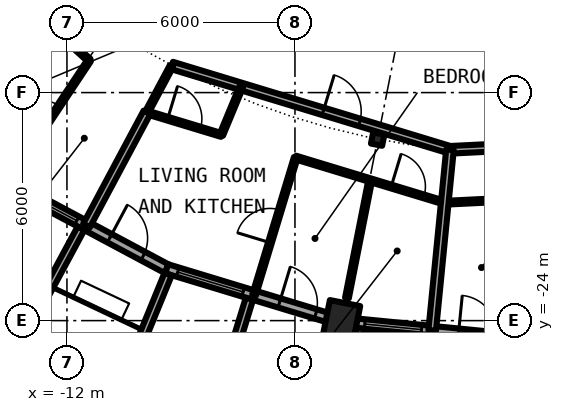
"""IFC4 building model, lengths in metres.
Left out: names, types, materials, properties, quantities, classifications, styles, units other than length and angle.
Written with IfcOpenShell. Run it as: python <this file> out.ifc"""

import sys

from ifc_helpers import new_model, si_unit, direction, frame, frame_2d, origin, origin_2d, place, context, subcontext, project, spatial, rectangle, hollow_circle, i_section, extrude, element, fill, save


model = new_model("IFC4")
c1 = context("Model", 3, precision=1e-05, world=origin(), true_north=direction((0.0, 1.0)))
c2 = subcontext(c1, "Body", "Model", "MODEL_VIEW")
j1 = project(units=[si_unit("LENGTHUNIT", "METRE"), si_unit("PLANEANGLEUNIT", "RADIAN")], contexts=[c1])
p1 = place(None, origin())
s1 = spatial("IfcSite", under=j1, at=p1, CompositionType="ELEMENT")
p2 = place(p1, origin())
s2 = spatial("IfcBuilding", under=s1, at=p2, CompositionType="ELEMENT")
p3 = place(p2, frame((0.0, 0.0, 243.2)))
s3 = spatial("IfcBuildingStorey", under=s2, at=p3, CompositionType="ELEMENT", Elevation=243.2)
p4 = place(p3, frame((-4.934, -24.803, 0.242), z_axis=(0.081385783955, 0.409141348854, 0.908834259273), x_axis=(-0.980784129255, 0.195096109141, 0.0)))
e1 = element("IfcColumn", 1, at=p4, inside=s3, PredefinedType="COLUMN", context=c2, shape_type="SweptSolid", body=[
    extrude(hollow_circle(Radius=0.406, WallThickness=0.03, at=origin_2d()), origin(), (0.0, 0.0, 1.0), 3.09),
])
p5 = place(p3, frame((-3.824, -19.223, 0.0), z_axis=(0.0, 0.0, 1.0), x_axis=(-0.195090322016, -0.980785280403, 0.0)))
e2 = element("IfcColumn", 2, at=p5, inside=s3, PredefinedType="COLUMN", context=c2, shape_type="SweptSolid", body=[
    extrude(i_section(OverallWidth=0.3, OverallDepth=0.3, WebThickness=0.011, FlangeThickness=0.019, FilletRadius=0.027, at=origin_2d()), origin(), (0.0, 0.0, 1.0), 3.05),
])
p6 = place(p3, frame((-13.611, -20.371, 0.0), z_axis=(0.0, 0.0, 1.0), x_axis=(0.881903608701, -0.471429766731, 0.0)))
e3 = element("IfcWall", 3, at=p6, inside=s3, PredefinedType="SOLIDWALL", context=c2, shape_type="SweptSolid", body=[
    extrude(rectangle(XDim=4.802, YDim=0.25, at=frame_2d((2.401, 0.0))), origin(), (0.0, 0.0, 1.0), 2.7),
])
p7 = place(p6, frame((0.62, 0.0, 0.3)))
e4 = element("IfcOpeningElement", 4, at=p7, cuts=e3, PredefinedType="OPENING", context=c2, shape_type="SweptSolid", body=[
    extrude(rectangle(XDim=1.5, YDim=2.1, at=frame_2d((0.75, 1.05))), frame((0.0, 0.135, 0.0), z_axis=(0.0, -1.0, 0.0), x_axis=(1.0, 0.0, 0.0)), (0.0, 0.0, 1.0), 0.27),
])
p8 = place(p6, frame((3.099, 0.0, 0.0)))
e5 = element("IfcOpeningElement", 5, at=p8, cuts=e3, PredefinedType="OPENING", context=c2, shape_type="SweptSolid", body=[
    extrude(rectangle(XDim=1.0, YDim=2.2, at=frame_2d((0.5, 1.1))), frame((0.0, 0.135, 0.0), z_axis=(0.0, -1.0, 0.0), x_axis=(1.0, 0.0, 0.0)), (0.0, 0.0, 1.0), 0.27),
])
p9 = place(p3, frame((-11.631, -21.572, -0.03), z_axis=(0.0, 0.0, 1.0), x_axis=(-0.474649669009, -0.880174807473, 0.0)))
e6 = element("IfcWall", 6, at=p9, inside=s3, PredefinedType="SOLIDWALL", context=c2, shape_type="SweptSolid", body=[
    extrude(rectangle(XDim=2.991, YDim=0.2, at=frame_2d((1.496, 0.0))), origin(), (0.0, 0.0, 1.0), 2.73),
])
p10 = place(p3, frame((-9.376, -22.635, 0.0), z_axis=(0.0, 0.0, 1.0), x_axis=(0.956947414517, -0.290261340605, 0.0)))
e7 = element("IfcWall", 7, at=p10, inside=s3, PredefinedType="SOLIDWALL", context=c2, shape_type="SweptSolid", body=[
    extrude(rectangle(XDim=4.803, YDim=0.25, at=frame_2d((2.401, 0.0))), origin(), (0.0, 0.0, 1.0), 2.7),
])
p11 = place(p10, frame((0.304, 0.0, 0.3)))
e8 = element("IfcOpeningElement", 8, at=p11, cuts=e7, PredefinedType="OPENING", context=c2, shape_type="SweptSolid", body=[
    extrude(rectangle(XDim=1.8, YDim=2.1, at=frame_2d((0.9, 1.05))), frame((0.0, 0.135, 0.0), z_axis=(0.0, -1.0, 0.0), x_axis=(1.0, 0.0, 0.0)), (0.0, 0.0, 1.0), 0.27),
])
p12 = place(p10, frame((3.099, 0.0, 0.0)))
e9 = element("IfcOpeningElement", 9, at=p12, cuts=e7, PredefinedType="OPENING", context=c2, shape_type="SweptSolid", body=[
    extrude(rectangle(XDim=1.0, YDim=2.2, at=frame_2d((0.5, 1.1))), frame((0.0, 0.135, 0.0), z_axis=(0.0, -1.0, 0.0), x_axis=(1.0, 0.0, 0.0)), (0.0, 0.0, 1.0), 0.27),
])
p13 = place(p3, frame((-9.338, -22.777, -0.03), z_axis=(0.0, 0.0, 1.0), x_axis=(-0.379219850791, -0.925306600412, 0.0)))
e10 = element("IfcWall", 10, at=p13, inside=s3, PredefinedType="SOLIDWALL", context=c2, shape_type="SweptSolid", body=[
    extrude(rectangle(XDim=2.882, YDim=0.2, at=frame_2d((1.441, 0.0))), origin(), (0.0, 0.0, 1.0), 2.73),
])
p14 = place(p3, frame((-7.199, -23.426, -0.03), z_axis=(0.0, 0.0, 1.0), x_axis=(-0.293764720054, -0.95587775853, 0.0)))
e11 = element("IfcWall", 11, at=p14, inside=s3, PredefinedType="SOLIDWALL", context=c2, shape_type="SweptSolid", body=[
    extrude(rectangle(XDim=2.992, YDim=0.2, at=frame_2d((1.496, 0.0))), origin(), (0.0, 0.0, 1.0), 2.73),
])
p15 = place(p3, frame((-4.78, -24.029, 0.0), z_axis=(0.0, 0.0, 1.0), x_axis=(0.995181568754, -0.098049197923, 0.0)))
e12 = element("IfcWall", 12, at=p15, inside=s3, PredefinedType="SOLIDWALL", context=c2, shape_type="SweptSolid", body=[
    extrude(rectangle(XDim=4.803, YDim=0.25, at=frame_2d((2.402, 0.0))), origin(), (0.0, 0.0, 1.0), 2.7),
])
p16 = place(p15, frame((0.62, 0.0, 0.3)))
e13 = element("IfcOpeningElement", 13, at=p16, cuts=e12, PredefinedType="OPENING", context=c2, shape_type="SweptSolid", body=[
    extrude(rectangle(XDim=1.5, YDim=2.1, at=frame_2d((0.75, 1.05))), frame((0.0, 0.135, 0.0), z_axis=(0.0, -1.0, 0.0), x_axis=(1.0, 0.0, 0.0)), (0.0, 0.0, 1.0), 0.27),
])
p17 = place(p15, frame((3.099, 0.0, 0.0)))
e14 = element("IfcOpeningElement", 14, at=p17, cuts=e12, PredefinedType="OPENING", context=c2, shape_type="SweptSolid", body=[
    extrude(rectangle(XDim=1.0, YDim=2.2, at=frame_2d((0.5, 1.1))), frame((0.0, 0.135, 0.0), z_axis=(0.0, -1.0, 0.0), x_axis=(1.0, 0.0, 0.0)), (0.0, 0.0, 1.0), 0.27),
])
p18 = place(p3, frame((-4.274, -24.205, -0.03), z_axis=(0.0, 0.0, 1.0), x_axis=(-0.173637488752, -0.984809637697, 0.0)))
e15 = element("IfcWall", 15, at=p18, inside=s3, PredefinedType="SOLIDWALL", context=c2, shape_type="SweptSolid", body=[
    extrude(rectangle(XDim=2.92, YDim=0.2, at=frame_2d((1.46, 0.0))), origin(), (0.0, 0.0, 1.0), 2.73),
])
p19 = place(p3, frame((-2.058, -20.899, 0.0), z_axis=(0.0, 0.0, 1.0), x_axis=(0.998793793092, 0.049101516075, 0.0)))
e16 = element("IfcWall", 16, at=p19, inside=s3, PredefinedType="PARTITIONING", context=c2, shape_type="SweptSolid", body=[
    extrude(rectangle(XDim=2.053, YDim=0.1, at=frame_2d((1.027, 0.0))), origin(), (0.0, 0.0, 1.0), 2.7),
])
p20 = place(p3, frame((-9.893, -18.523, 0.0), z_axis=(0.0, 0.0, 1.0), x_axis=(0.957015380529, -0.2900371725, 0.0)))
e17 = element("IfcWall", 17, at=p20, inside=s3, PredefinedType="PARTITIONING", context=c2, shape_type="SweptSolid", body=[
    extrude(rectangle(XDim=2.048, YDim=0.1, at=frame_2d((1.024, 0.0))), origin(), (0.0, 0.0, 1.0), 2.7),
])
p21 = place(p20, frame((0.568, 0.0, 0.0)))
e18 = element("IfcOpeningElement", 18, at=p21, cuts=e17, PredefinedType="OPENING", context=c2, shape_type="SweptSolid", body=[
    extrude(rectangle(XDim=0.9, YDim=2.3, at=frame_2d((0.45, 1.15))), frame((0.0, 0.06, 0.0), z_axis=(0.0, -1.0, 0.0), x_axis=(1.0, 0.0, 0.0)), (0.0, 0.0, 1.0), 0.12),
])
p22 = place(p3, frame((-5.982, -19.709, 0.0), z_axis=(0.0, 0.0, 1.0), x_axis=(0.956962336556, -0.290212140362, 0.0)))
e19 = element("IfcWall", 19, at=p22, inside=s3, PredefinedType="PARTITIONING", context=c2, shape_type="SweptSolid", body=[
    extrude(rectangle(XDim=4.104, YDim=0.1, at=frame_2d((2.052, 0.0))), origin(), (0.0, 0.0, 1.0), 2.7),
])
p23 = place(p22, frame((2.628, 0.0, 0.0)))
e20 = element("IfcOpeningElement", 20, at=p23, cuts=e19, PredefinedType="OPENING", context=c2, shape_type="SweptSolid", body=[
    extrude(rectangle(XDim=0.9, YDim=2.3, at=frame_2d((0.45, 1.15))), frame((0.0, 0.06, 0.0), z_axis=(0.0, -1.0, 0.0), x_axis=(1.0, 0.0, 0.0)), (0.0, 0.0, 1.0), 0.12),
])
p24 = place(p3, frame((-14.437, -14.409, 0.0), z_axis=(0.0, 0.0, 1.0), x_axis=(0.740802780294, -0.671722592078, 0.0)))
e21 = element("IfcWall", 21, at=p24, inside=s3, PredefinedType="PARTITIONING", context=c2, shape_type="SweptSolid", body=[
    extrude(rectangle(XDim=4.082, YDim=0.1, at=frame_2d((2.041, 0.0))), origin(), (0.0, 0.0, 1.0), 2.7),
])
p25 = place(p24, frame((2.612, 0.0, 0.0)))
e22 = element("IfcOpeningElement", 22, at=p25, cuts=e21, PredefinedType="OPENING", context=c2, shape_type="SweptSolid", body=[
    extrude(rectangle(XDim=0.9, YDim=2.3, at=frame_2d((0.45, 1.15))), frame((0.0, 0.06, 0.0), z_axis=(0.0, -1.0, 0.0), x_axis=(1.0, 0.0, 0.0)), (0.0, 0.0, 1.0), 0.12),
])
p26 = place(p3, frame((-1.921, -19.506, 0.0), z_axis=(0.0, 0.0, 1.0), x_axis=(0.998783562084, 0.049309188909, 0.0)))
e23 = element("IfcWall", 23, at=p26, inside=s3, PredefinedType="PARTITIONING", context=c2, shape_type="SweptSolid", body=[
    extrude(rectangle(XDim=5.6, YDim=0.2, at=frame_2d((2.8, 0.0))), origin(), (0.0, 0.0, 1.0), 2.45),
])
p27 = place(p26, frame((1.417, 0.0, 0.0)))
e24 = element("IfcOpeningElement", 24, at=p27, cuts=e23, PredefinedType="OPENING", context=c2, shape_type="SweptSolid", body=[
    extrude(rectangle(XDim=1.0, YDim=2.3, at=frame_2d((0.5, 1.15))), frame((0.0, 0.11, 0.0), z_axis=(0.0, -1.0, 0.0), x_axis=(1.0, 0.0, 0.0)), (0.0, 0.0, 1.0), 0.22),
])
p28 = place(p3, frame((-9.239, -17.286, 0.0), z_axis=(0.0, 0.0, 1.0), x_axis=(0.956929842753, -0.290319265721, 0.0)))
e25 = element("IfcWall", 25, at=p28, inside=s3, PredefinedType="PARTITIONING", context=c2, shape_type="SweptSolid", body=[
    extrude(rectangle(XDim=7.647, YDim=0.2, at=frame_2d((3.824, 0.0))), origin(), (0.0, 0.0, 1.0), 2.45),
])
p29 = place(p28, frame((4.161, 0.0, 0.0)))
e26 = element("IfcOpeningElement", 26, at=p29, cuts=e25, PredefinedType="OPENING", context=c2, shape_type="SweptSolid", body=[
    extrude(rectangle(XDim=1.0, YDim=2.3, at=frame_2d((0.5, 1.15))), frame((0.0, 0.11, 0.0), z_axis=(0.0, -1.0, 0.0), x_axis=(1.0, 0.0, 0.0)), (0.0, 0.0, 1.0), 0.22),
])
p30 = place(p3, frame((-13.217, -19.864, 0.0), z_axis=(0.0, 0.0, 1.0), x_axis=(0.553749157203, 0.832683535862, 0.0)))
e27 = element("IfcWall", 27, at=p30, inside=s3, PredefinedType="PARTITIONING", context=c2, shape_type="SweptSolid", body=[
    extrude(rectangle(XDim=3.26, YDim=0.1, at=frame_2d((1.63, 0.0))), origin(), (0.0, 0.0, 1.0), 2.7),
])
p31 = place(p30, frame((0.922, 0.0, 0.0)))
e28 = element("IfcOpeningElement", 28, at=p31, cuts=e27, PredefinedType="OPENING", context=c2, shape_type="SweptSolid", body=[
    extrude(rectangle(XDim=0.9, YDim=2.3, at=frame_2d((0.45, 1.15))), frame((0.0, 0.06, 0.0), z_axis=(0.0, -1.0, 0.0), x_axis=(1.0, 0.0, 0.0)), (0.0, 0.0, 1.0), 0.12),
])
p32 = place(p3, frame((-11.485, -21.499, 0.0), z_axis=(0.0, 0.0, 1.0), x_axis=(0.471125037246, 0.882066436999, 0.0)))
e29 = element("IfcWall", 29, at=p32, inside=s3, PredefinedType="PARTITIONING", context=c2, shape_type="SweptSolid", body=[
    extrude(rectangle(XDim=3.375, YDim=0.2, at=frame_2d((1.688, 0.0))), origin(), (0.0, 0.0, 1.0), 2.7),
])
p33 = place(p3, frame((-7.939, -19.115, 0.0), z_axis=(0.0, 0.0, 1.0), x_axis=(0.383534338408, 0.923526616434, 0.0)))
e30 = element("IfcWall", 30, at=p33, inside=s3, PredefinedType="PARTITIONING", context=c2, shape_type="SweptSolid", body=[
    extrude(rectangle(XDim=1.379, YDim=0.1, at=frame_2d((0.69, 0.0))), origin(), (0.0, 0.0, 1.0), 2.7),
])
p34 = place(p3, frame((-7.076, -23.325, 0.0), z_axis=(0.0, 0.0, 1.0), x_axis=(0.290364312451, 0.956916175041, 0.0)))
e31 = element("IfcWall", 31, at=p34, inside=s3, PredefinedType="PARTITIONING", context=c2, shape_type="SweptSolid", body=[
    extrude(rectangle(XDim=3.778, YDim=0.1, at=frame_2d((1.889, 0.0))), origin(), (0.0, 0.0, 1.0), 2.7),
])
p35 = place(p34, frame((1.439, 0.0, 0.0)))
e32 = element("IfcOpeningElement", 32, at=p35, cuts=e31, PredefinedType="OPENING", context=c2, shape_type="SweptSolid", body=[
    extrude(rectangle(XDim=0.9, YDim=2.3, at=frame_2d((0.45, 1.15))), frame((0.0, 0.06, 0.0), z_axis=(0.0, -1.0, 0.0), x_axis=(1.0, 0.0, 0.0)), (0.0, 0.0, 1.0), 0.12),
])
p36 = place(p3, frame((-2.389, -24.258, 0.0), z_axis=(0.0, 0.0, 1.0), x_axis=(0.098015283173, 0.995184909584, 0.0)))
e33 = element("IfcWall", 33, at=p36, inside=s3, PredefinedType="PARTITIONING", context=c2, shape_type="SweptSolid", body=[
    extrude(rectangle(XDim=4.775, YDim=0.2, at=frame_2d((2.387, 0.0))), origin(), (0.0, 0.0, 1.0), 2.7),
])
p37 = place(p3, frame((-4.632, -23.405, 0.0), z_axis=(0.0, 0.0, 1.0), x_axis=(0.193932328519, 0.98101490914, 0.0)))
e34 = element("IfcWall", 34, at=p37, inside=s3, PredefinedType="PARTITIONING", context=c2, shape_type="SweptSolid", body=[
    extrude(rectangle(XDim=3.161, YDim=0.1, at=frame_2d((1.581, 0.0))), origin(), (0.0, 0.0, 1.0), 2.7),
])
p38 = place(p3, frame((-9.889, -18.502, 0.0), z_axis=(0.0, 0.0, 1.0), x_axis=(0.471138605408, 0.882059189904, 0.0)))
e35 = element("IfcWall", 35, at=p38, inside=s3, PredefinedType="PARTITIONING", context=c2, shape_type="SweptSolid", body=[
    extrude(rectangle(XDim=1.358, YDim=0.1, at=frame_2d((0.679, 0.0))), origin(), (0.0, 0.0, 1.0), 2.7),
])
p39 = place(p7, origin())
e36 = element("IfcWindow", 36, at=p39, inside=s3, PartitioningType="SINGLE_PANEL", PredefinedType="WINDOW", context=c2, shape_type="SweptSolid", body=[
    extrude(rectangle(XDim=1.5, YDim=2.1, at=frame_2d((0.75, 1.05))), frame((0.0, 0.03, 0.0), z_axis=(0.0, -1.0, 0.0), x_axis=(1.0, 0.0, 0.0)), (0.0, 0.0, 1.0), 0.06),
])
fill(e4, e36)
p40 = place(p8, origin())
e37 = element("IfcDoor", 37, at=p40, inside=s3, OperationType="SINGLE_SWING_LEFT", PredefinedType="DOOR", context=c2, shape_type="SweptSolid", body=[
    extrude(rectangle(XDim=1.0, YDim=2.2, at=frame_2d((0.5, 1.1))), frame((0.0, 0.025, 0.0), z_axis=(0.0, -1.0, 0.0), x_axis=(1.0, 0.0, 0.0)), (0.0, 0.0, 1.0), 0.05),
])
fill(e5, e37)
p41 = place(p11, origin())
e38 = element("IfcWindow", 38, at=p41, inside=s3, PartitioningType="SINGLE_PANEL", PredefinedType="WINDOW", context=c2, shape_type="SweptSolid", body=[
    extrude(rectangle(XDim=1.8, YDim=2.1, at=frame_2d((0.9, 1.05))), frame((0.0, 0.03, 0.0), z_axis=(0.0, -1.0, 0.0), x_axis=(1.0, 0.0, 0.0)), (0.0, 0.0, 1.0), 0.06),
])
fill(e8, e38)
p42 = place(p12, origin())
e39 = element("IfcDoor", 39, at=p42, inside=s3, OperationType="SINGLE_SWING_LEFT", PredefinedType="DOOR", context=c2, shape_type="SweptSolid", body=[
    extrude(rectangle(XDim=1.0, YDim=2.2, at=frame_2d((0.5, 1.1))), frame((0.0, 0.025, 0.0), z_axis=(0.0, -1.0, 0.0), x_axis=(1.0, 0.0, 0.0)), (0.0, 0.0, 1.0), 0.05),
])
fill(e9, e39)
p43 = place(p16, origin())
e40 = element("IfcWindow", 40, at=p43, inside=s3, PartitioningType="SINGLE_PANEL", PredefinedType="WINDOW", context=c2, shape_type="SweptSolid", body=[
    extrude(rectangle(XDim=1.5, YDim=2.1, at=frame_2d((0.75, 1.05))), frame((0.0, 0.03, 0.0), z_axis=(0.0, -1.0, 0.0), x_axis=(1.0, 0.0, 0.0)), (0.0, 0.0, 1.0), 0.06),
])
fill(e13, e40)
p44 = place(p31, origin())
e41 = element("IfcDoor", 41, at=p44, inside=s3, OperationType="SINGLE_SWING_LEFT", PredefinedType="DOOR", context=c2, shape_type="SweptSolid", body=[
    extrude(rectangle(XDim=0.9, YDim=2.3, at=frame_2d((0.45, 1.15))), frame((0.0, 0.025, 0.0), z_axis=(0.0, -1.0, 0.0), x_axis=(1.0, 0.0, 0.0)), (0.0, 0.0, 1.0), 0.05),
])
fill(e28, e41)
p45 = place(p29, origin())
e42 = element("IfcDoor", 42, at=p45, inside=s3, OperationType="SINGLE_SWING_RIGHT", PredefinedType="DOOR", context=c2, shape_type="SweptSolid", body=[
    extrude(rectangle(XDim=1.0, YDim=2.3, at=frame_2d((0.5, 1.15))), frame((0.0, 0.025, 0.0), z_axis=(0.0, -1.0, 0.0), x_axis=(1.0, 0.0, 0.0)), (0.0, 0.0, 1.0), 0.05),
])
fill(e26, e42)
p46 = place(p21, origin())
e43 = element("IfcDoor", 43, at=p46, inside=s3, OperationType="SINGLE_SWING_LEFT", PredefinedType="DOOR", context=c2, shape_type="SweptSolid", body=[
    extrude(rectangle(XDim=0.9, YDim=2.3, at=frame_2d((0.45, 1.15))), frame((0.0, 0.025, 0.0), z_axis=(0.0, -1.0, 0.0), x_axis=(1.0, 0.0, 0.0)), (0.0, 0.0, 1.0), 0.05),
])
fill(e18, e43)
p47 = place(p35, origin())
e44 = element("IfcDoor", 44, at=p47, inside=s3, OperationType="SINGLE_SWING_RIGHT", PredefinedType="DOOR", context=c2, shape_type="SweptSolid", body=[
    extrude(rectangle(XDim=0.9, YDim=2.3, at=frame_2d((0.45, 1.15))), frame((0.0, 0.025, 0.0), z_axis=(0.0, -1.0, 0.0), x_axis=(1.0, 0.0, 0.0)), (0.0, 0.0, 1.0), 0.05),
])
fill(e32, e44)
p48 = place(p23, origin())
e45 = element("IfcDoor", 45, at=p48, inside=s3, OperationType="SINGLE_SWING_RIGHT", PredefinedType="DOOR", context=c2, shape_type="SweptSolid", body=[
    extrude(rectangle(XDim=0.9, YDim=2.3, at=frame_2d((0.45, 1.15))), frame((0.0, 0.025, 0.0), z_axis=(0.0, -1.0, 0.0), x_axis=(1.0, 0.0, 0.0)), (0.0, 0.0, 1.0), 0.05),
])
fill(e20, e45)
save(model, sys.argv[1])
